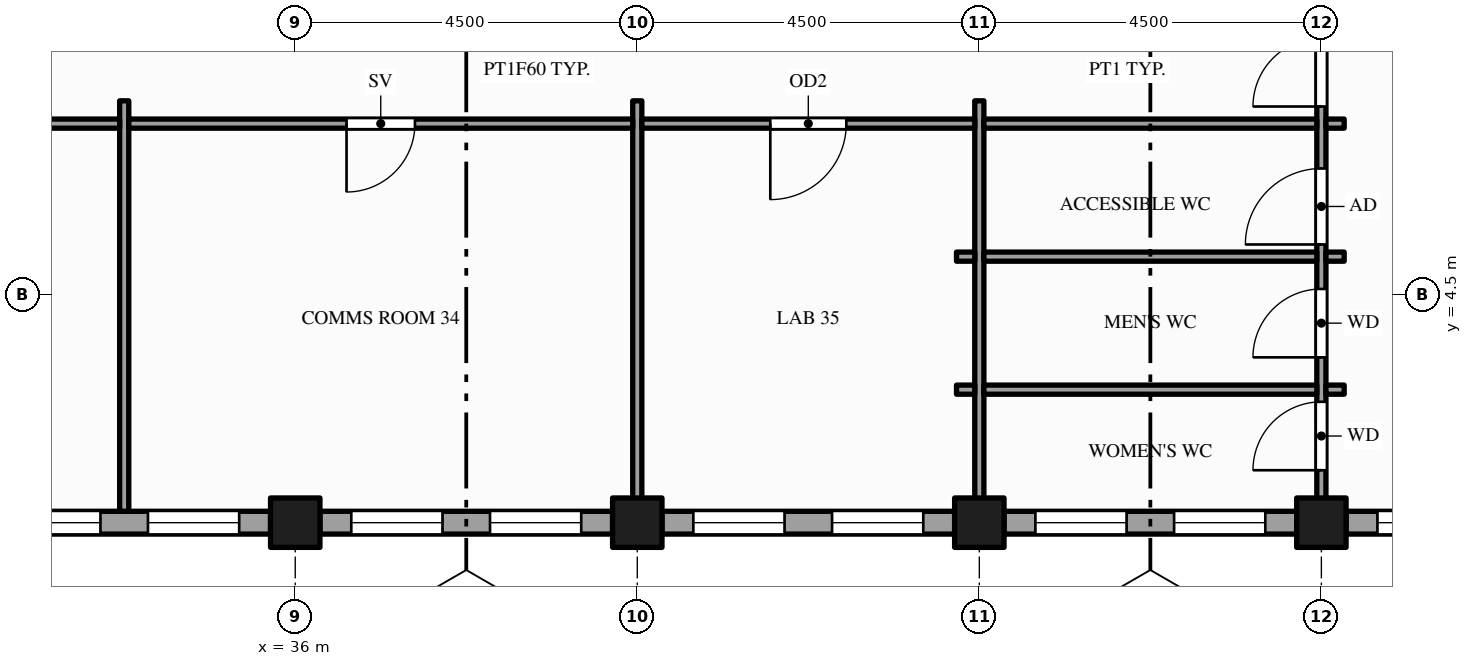
"""IFC4 building model, lengths in metres.
Left out: names, types, materials, properties, quantities, classifications, styles, units other than length and angle.
Written with IfcOpenShell. Run it as: python <this file> out.ifc"""

import sys

from ifc_helpers import new_model, si_unit, direction, frame, frame_2d, origin, origin_2d, place, context, subcontext, project, spatial, rectangle, hollow_rectangle, extrude, element, fill, save


model = new_model("IFC4")
c1 = context("Model", 3, precision=1e-05, world=origin(), true_north=direction((0.0, 1.0)))
c2 = subcontext(c1, "Body", "Model", "MODEL_VIEW")
j1 = project(units=[si_unit("LENGTHUNIT", "METRE"), si_unit("PLANEANGLEUNIT", "RADIAN")], contexts=[c1])
p1 = place(None, origin())
s1 = spatial("IfcSite", under=j1, at=p1, CompositionType="ELEMENT")
p2 = place(p1, origin())
s2 = spatial("IfcBuilding", under=s1, at=p2, CompositionType="ELEMENT")
p3 = place(p2, frame((0.0, 0.0, 269.0)))
s3 = spatial("IfcBuildingStorey", under=s2, at=p3, CompositionType="ELEMENT", Elevation=269.0)
for number, where, z_axis, x_axis in (
    (1, (36.0, 1.5, -0.15), (0.0, 0.0, 1.0), (1.0, 0.0, 0.0)),
    (2, (40.5, 1.5, -0.15), (0.0, 0.0, 1.0), (1.0, 0.0, 0.0)),
    (3, (45.0, 1.5, -0.15), (0.0, 0.0, 1.0), (1.0, 0.0, 0.0)),
    (4, (49.5, 1.5, -0.15), (0.0, 0.0, 1.0), (1.0, 0.0, 0.0)),
):
    element("IfcColumn", number, at=place(p3, frame(where, z_axis=z_axis, x_axis=x_axis)), inside=s3, PredefinedType="COLUMN", context=c2, shape_type="SweptSolid", body=[
        extrude(hollow_rectangle(XDim=0.65, YDim=0.65, WallThickness=0.032, at=origin_2d()), origin(), (0.0, 0.0, 1.0), 4.0),
    ])
p4 = place(p3, frame((31.825, 1.5, 0.0), z_axis=(0.0, 0.0, 1.0), x_axis=(1.0, 0.0, 0.0)))
e5 = element("IfcWall", 5, at=p4, inside=s3, PredefinedType="STANDARD", context=c2, shape_type="SweptSolid", body=[
    extrude(rectangle(XDim=3.85, YDim=0.3, at=frame_2d((1.925, 0.0))), origin(), (0.0, 0.0, 1.0), 2.87),
])
p5 = place(p4, frame((0.413, 0.0, 0.9)))
e6 = element("IfcOpeningElement", 6, at=p5, cuts=e5, PredefinedType="OPENING", context=c2, shape_type="SweptSolid", body=[
    extrude(rectangle(XDim=1.2, YDim=1.75, at=frame_2d((0.6, 0.875))), frame((0.0, 0.16, 0.0), z_axis=(0.0, -1.0, 0.0), x_axis=(1.0, 0.0, 0.0)), (0.0, 0.0, 1.0), 0.32),
])
p6 = place(p4, frame((2.238, 0.0, 0.9)))
e7 = element("IfcOpeningElement", 7, at=p6, cuts=e5, PredefinedType="OPENING", context=c2, shape_type="SweptSolid", body=[
    extrude(rectangle(XDim=1.2, YDim=1.75, at=frame_2d((0.6, 0.875))), frame((0.0, 0.16, 0.0), z_axis=(0.0, -1.0, 0.0), x_axis=(1.0, 0.0, 0.0)), (0.0, 0.0, 1.0), 0.32),
])
p7 = place(p3, frame((36.325, 1.5, 0.0), z_axis=(0.0, 0.0, 1.0), x_axis=(1.0, 0.0, 0.0)))
e8 = element("IfcWall", 8, at=p7, inside=s3, PredefinedType="STANDARD", context=c2, shape_type="SweptSolid", body=[
    extrude(rectangle(XDim=3.85, YDim=0.3, at=frame_2d((1.925, 0.0))), origin(), (0.0, 0.0, 1.0), 2.87),
])
p8 = place(p7, frame((0.413, 0.0, 0.9)))
e9 = element("IfcOpeningElement", 9, at=p8, cuts=e8, PredefinedType="OPENING", context=c2, shape_type="SweptSolid", body=[
    extrude(rectangle(XDim=1.2, YDim=1.75, at=frame_2d((0.6, 0.875))), frame((0.0, 0.16, 0.0), z_axis=(0.0, -1.0, 0.0), x_axis=(1.0, 0.0, 0.0)), (0.0, 0.0, 1.0), 0.32),
])
p9 = place(p7, frame((2.238, 0.0, 0.9)))
e10 = element("IfcOpeningElement", 10, at=p9, cuts=e8, PredefinedType="OPENING", context=c2, shape_type="SweptSolid", body=[
    extrude(rectangle(XDim=1.2, YDim=1.75, at=frame_2d((0.6, 0.875))), frame((0.0, 0.16, 0.0), z_axis=(0.0, -1.0, 0.0), x_axis=(1.0, 0.0, 0.0)), (0.0, 0.0, 1.0), 0.32),
])
p10 = place(p3, frame((40.825, 1.5, 0.0), z_axis=(0.0, 0.0, 1.0), x_axis=(1.0, 0.0, 0.0)))
e11 = element("IfcWall", 11, at=p10, inside=s3, PredefinedType="STANDARD", context=c2, shape_type="SweptSolid", body=[
    extrude(rectangle(XDim=3.85, YDim=0.3, at=frame_2d((1.925, 0.0))), origin(), (0.0, 0.0, 1.0), 2.87),
])
p11 = place(p10, frame((0.413, 0.0, 0.9)))
e12 = element("IfcOpeningElement", 12, at=p11, cuts=e11, PredefinedType="OPENING", context=c2, shape_type="SweptSolid", body=[
    extrude(rectangle(XDim=1.2, YDim=1.75, at=frame_2d((0.6, 0.875))), frame((0.0, 0.16, 0.0), z_axis=(0.0, -1.0, 0.0), x_axis=(1.0, 0.0, 0.0)), (0.0, 0.0, 1.0), 0.32),
])
p12 = place(p10, frame((2.238, 0.0, 0.9)))
e13 = element("IfcOpeningElement", 13, at=p12, cuts=e11, PredefinedType="OPENING", context=c2, shape_type="SweptSolid", body=[
    extrude(rectangle(XDim=1.2, YDim=1.75, at=frame_2d((0.6, 0.875))), frame((0.0, 0.16, 0.0), z_axis=(0.0, -1.0, 0.0), x_axis=(1.0, 0.0, 0.0)), (0.0, 0.0, 1.0), 0.32),
])
p13 = place(p3, frame((45.325, 1.5, 0.0), z_axis=(0.0, 0.0, 1.0), x_axis=(1.0, 0.0, 0.0)))
e14 = element("IfcWall", 14, at=p13, inside=s3, PredefinedType="STANDARD", context=c2, shape_type="SweptSolid", body=[
    extrude(rectangle(XDim=3.85, YDim=0.3, at=frame_2d((1.925, 0.0))), origin(), (0.0, 0.0, 1.0), 2.87),
])
p14 = place(p13, frame((0.413, 0.0, 0.9)))
e15 = element("IfcOpeningElement", 15, at=p14, cuts=e14, PredefinedType="OPENING", context=c2, shape_type="SweptSolid", body=[
    extrude(rectangle(XDim=1.2, YDim=1.75, at=frame_2d((0.6, 0.875))), frame((0.0, 0.16, 0.0), z_axis=(0.0, -1.0, 0.0), x_axis=(1.0, 0.0, 0.0)), (0.0, 0.0, 1.0), 0.32),
])
p15 = place(p13, frame((2.238, 0.0, 0.9)))
e16 = element("IfcOpeningElement", 16, at=p15, cuts=e14, PredefinedType="OPENING", context=c2, shape_type="SweptSolid", body=[
    extrude(rectangle(XDim=1.2, YDim=1.75, at=frame_2d((0.6, 0.875))), frame((0.0, 0.16, 0.0), z_axis=(0.0, -1.0, 0.0), x_axis=(1.0, 0.0, 0.0)), (0.0, 0.0, 1.0), 0.32),
])
p16 = place(p3, frame((49.825, 1.5, 0.0), z_axis=(0.0, 0.0, 1.0), x_axis=(1.0, 0.0, 0.0)))
e17 = element("IfcWall", 17, at=p16, inside=s3, PredefinedType="STANDARD", context=c2, shape_type="SweptSolid", body=[
    extrude(rectangle(XDim=4.175, YDim=0.3, at=frame_2d((2.087, 0.0))), origin(), (0.0, 0.0, 1.0), 2.87),
])
p17 = place(p16, frame((0.413, 0.0, 0.9)))
e18 = element("IfcOpeningElement", 18, at=p17, cuts=e17, PredefinedType="OPENING", context=c2, shape_type="SweptSolid", body=[
    extrude(rectangle(XDim=1.2, YDim=1.75, at=frame_2d((0.6, 0.875))), frame((0.0, 0.16, 0.0), z_axis=(0.0, -1.0, 0.0), x_axis=(1.0, 0.0, 0.0)), (0.0, 0.0, 1.0), 0.32),
])
p18 = place(p16, frame((2.225, 0.0, 0.9)))
e19 = element("IfcOpeningElement", 19, at=p18, cuts=e17, PredefinedType="OPENING", context=c2, shape_type="SweptSolid", body=[
    extrude(rectangle(XDim=1.55, YDim=1.75, at=frame_2d((0.775, 0.875))), frame((0.0, 0.16, 0.0), z_axis=(0.0, -1.0, 0.0), x_axis=(1.0, 0.0, 0.0)), (0.0, 0.0, 1.0), 0.32),
])
for number, where, z_axis, x_axis in (
    (20, (33.75, 1.65, 0.0), (0.0, 0.0, 1.0), (0.0, 1.0, 0.0)),
    (21, (40.5, 1.65, 0.0), (0.0, 0.0, 1.0), (0.0, 1.0, 0.0)),
    (22, (45.0, 1.65, 0.0), (0.0, 0.0, 1.0), (0.0, 1.0, 0.0)),
):
    element("IfcWall", number, at=place(p3, frame(where, z_axis=z_axis, x_axis=x_axis)), inside=s3, PredefinedType="PARTITIONING", context=c2, shape_type="SweptSolid", body=[
        extrude(rectangle(XDim=5.4, YDim=0.12, at=frame_2d((2.7, 0.0))), origin(), (0.0, 0.0, 1.0), 2.87),
    ])
p19 = place(p3, frame((49.5, 1.65, 0.0), z_axis=(0.0, 0.0, 1.0), x_axis=(0.0, 1.0, 0.0)))
e23 = element("IfcWall", 23, at=p19, inside=s3, PredefinedType="PARTITIONING", context=c2, shape_type="SweptSolid", body=[
    extrude(rectangle(XDim=22.2, YDim=0.12, at=frame_2d((11.1, 0.0))), origin(), (0.0, 0.0, 1.0), 2.87),
])
p20 = place(p19, frame((5.325, 0.0, 0.0)))
e24 = element("IfcOpeningElement", 24, at=p20, cuts=e23, PredefinedType="OPENING", context=c2, shape_type="SweptSolid", body=[
    extrude(rectangle(XDim=1.8, YDim=2.1, at=frame_2d((0.9, 1.05))), frame((0.0, 0.07, 0.0), z_axis=(0.0, -1.0, 0.0), x_axis=(1.0, 0.0, 0.0)), (0.0, 0.0, 1.0), 0.14),
])
p21 = place(p19, frame((0.54, 0.0, 0.0)))
e25 = element("IfcOpeningElement", 25, at=p21, cuts=e23, PredefinedType="OPENING", context=c2, shape_type="SweptSolid", body=[
    extrude(rectangle(XDim=0.9, YDim=2.1, at=frame_2d((0.45, 1.05))), frame((0.0, 0.07, 0.0), z_axis=(0.0, -1.0, 0.0), x_axis=(1.0, 0.0, 0.0)), (0.0, 0.0, 1.0), 0.14),
])
p22 = place(p19, frame((2.025, 0.0, 0.0)))
e26 = element("IfcOpeningElement", 26, at=p22, cuts=e23, PredefinedType="OPENING", context=c2, shape_type="SweptSolid", body=[
    extrude(rectangle(XDim=0.9, YDim=2.1, at=frame_2d((0.45, 1.05))), frame((0.0, 0.07, 0.0), z_axis=(0.0, -1.0, 0.0), x_axis=(1.0, 0.0, 0.0)), (0.0, 0.0, 1.0), 0.14),
])
p23 = place(p19, frame((3.51, 0.0, 0.0)))
e27 = element("IfcOpeningElement", 27, at=p23, cuts=e23, PredefinedType="OPENING", context=c2, shape_type="SweptSolid", body=[
    extrude(rectangle(XDim=1.0, YDim=2.1, at=frame_2d((0.5, 1.05))), frame((0.0, 0.07, 0.0), z_axis=(0.0, -1.0, 0.0), x_axis=(1.0, 0.0, 0.0)), (0.0, 0.0, 1.0), 0.14),
])
p24 = place(p3, frame((44.7, 3.25, 0.0), z_axis=(0.0, 0.0, 1.0), x_axis=(1.0, 0.0, 0.0)))
e28 = element("IfcWall", 28, at=p24, inside=s3, PredefinedType="PARTITIONING", context=c2, shape_type="SweptSolid", body=[
    extrude(rectangle(XDim=0.24, YDim=0.12, at=frame_2d((0.12, 0.0))), origin(), (0.0, 0.0, 1.0), 2.87),
])
p25 = place(p3, frame((45.06, 3.25, 0.0), z_axis=(0.0, 0.0, 1.0), x_axis=(1.0, 0.0, 0.0)))
e29 = element("IfcWall", 29, at=p25, inside=s3, PredefinedType="PARTITIONING", context=c2, shape_type="SweptSolid", body=[
    extrude(rectangle(XDim=4.38, YDim=0.12, at=frame_2d((2.19, 0.0))), origin(), (0.0, 0.0, 1.0), 2.87),
])
for number, where, z_axis, x_axis in (
    (30, (49.56, 3.25, 0.0), (0.0, 0.0, 1.0), (1.0, 0.0, 0.0)),
    (31, (44.7, 5.0, 0.0), (0.0, 0.0, 1.0), (1.0, 0.0, 0.0)),
):
    element("IfcWall", number, at=place(p3, frame(where, z_axis=z_axis, x_axis=x_axis)), inside=s3, PredefinedType="PARTITIONING", context=c2, shape_type="SweptSolid", body=[
        extrude(rectangle(XDim=0.24, YDim=0.12, at=frame_2d((0.12, 0.0))), origin(), (0.0, 0.0, 1.0), 2.87),
    ])
p26 = place(p3, frame((45.06, 5.0, 0.0), z_axis=(0.0, 0.0, 1.0), x_axis=(1.0, 0.0, 0.0)))
e32 = element("IfcWall", 32, at=p26, inside=s3, PredefinedType="PARTITIONING", context=c2, shape_type="SweptSolid", body=[
    extrude(rectangle(XDim=4.38, YDim=0.12, at=frame_2d((2.19, 0.0))), origin(), (0.0, 0.0, 1.0), 2.87),
])
p27 = place(p3, frame((49.56, 5.0, 0.0), z_axis=(0.0, 0.0, 1.0), x_axis=(1.0, 0.0, 0.0)))
e33 = element("IfcWall", 33, at=p27, inside=s3, PredefinedType="PARTITIONING", context=c2, shape_type="SweptSolid", body=[
    extrude(rectangle(XDim=0.24, YDim=0.12, at=frame_2d((0.12, 0.0))), origin(), (0.0, 0.0, 1.0), 2.87),
])
p28 = place(p3, frame((27.06, 6.75, 0.0), z_axis=(0.0, 0.0, 1.0), x_axis=(1.0, 0.0, 0.0)))
e34 = element("IfcWall", 34, at=p28, inside=s3, PredefinedType="PARTITIONING", context=c2, shape_type="SweptSolid", body=[
    extrude(rectangle(XDim=6.63, YDim=0.12, at=frame_2d((3.315, 0.0))), origin(), (0.0, 0.0, 1.0), 2.87),
])
p29 = place(p28, frame((2.815, 0.0, 0.0)))
e35 = element("IfcOpeningElement", 35, at=p29, cuts=e34, PredefinedType="OPENING", context=c2, shape_type="SweptSolid", body=[
    extrude(rectangle(XDim=1.0, YDim=2.1, at=frame_2d((0.5, 1.05))), frame((0.0, 0.07, 0.0), z_axis=(0.0, -1.0, 0.0), x_axis=(1.0, 0.0, 0.0)), (0.0, 0.0, 1.0), 0.14),
])
p30 = place(p3, frame((33.81, 6.75, 0.0), z_axis=(0.0, 0.0, 1.0), x_axis=(1.0, 0.0, 0.0)))
e36 = element("IfcWall", 36, at=p30, inside=s3, PredefinedType="PARTITIONING", context=c2, shape_type="SweptSolid", body=[
    extrude(rectangle(XDim=6.63, YDim=0.12, at=frame_2d((3.315, 0.0))), origin(), (0.0, 0.0, 1.0), 2.87),
])
p31 = place(p30, frame((2.865, 0.0, 0.0)))
e37 = element("IfcOpeningElement", 37, at=p31, cuts=e36, PredefinedType="OPENING", context=c2, shape_type="SweptSolid", body=[
    extrude(rectangle(XDim=0.9, YDim=2.1, at=frame_2d((0.45, 1.05))), frame((0.0, 0.07, 0.0), z_axis=(0.0, -1.0, 0.0), x_axis=(1.0, 0.0, 0.0)), (0.0, 0.0, 1.0), 0.14),
])
p32 = place(p3, frame((40.56, 6.75, 0.0), z_axis=(0.0, 0.0, 1.0), x_axis=(1.0, 0.0, 0.0)))
e38 = element("IfcWall", 38, at=p32, inside=s3, PredefinedType="PARTITIONING", context=c2, shape_type="SweptSolid", body=[
    extrude(rectangle(XDim=4.38, YDim=0.12, at=frame_2d((2.19, 0.0))), origin(), (0.0, 0.0, 1.0), 2.87),
])
p33 = place(p32, frame((1.69, 0.0, 0.0)))
e39 = element("IfcOpeningElement", 39, at=p33, cuts=e38, PredefinedType="OPENING", context=c2, shape_type="SweptSolid", body=[
    extrude(rectangle(XDim=1.0, YDim=2.1, at=frame_2d((0.5, 1.05))), frame((0.0, 0.07, 0.0), z_axis=(0.0, -1.0, 0.0), x_axis=(1.0, 0.0, 0.0)), (0.0, 0.0, 1.0), 0.14),
])
p34 = place(p3, frame((45.06, 6.75, 0.0), z_axis=(0.0, 0.0, 1.0), x_axis=(1.0, 0.0, 0.0)))
e40 = element("IfcWall", 40, at=p34, inside=s3, PredefinedType="PARTITIONING", context=c2, shape_type="SweptSolid", body=[
    extrude(rectangle(XDim=4.38, YDim=0.12, at=frame_2d((2.19, 0.0))), origin(), (0.0, 0.0, 1.0), 2.87),
])
p35 = place(p3, frame((49.56, 6.75, 0.0), z_axis=(0.0, 0.0, 1.0), x_axis=(1.0, 0.0, 0.0)))
e41 = element("IfcWall", 41, at=p35, inside=s3, PredefinedType="PARTITIONING", context=c2, shape_type="SweptSolid", body=[
    extrude(rectangle(XDim=0.24, YDim=0.12, at=frame_2d((0.12, 0.0))), origin(), (0.0, 0.0, 1.0), 2.87),
])
p36 = place(p5, origin())
e42 = element("IfcWindow", 42, at=p36, inside=s3, PartitioningType="SINGLE_PANEL", PredefinedType="WINDOW", context=c2, shape_type="SweptSolid", body=[
    extrude(rectangle(XDim=1.2, YDim=1.75, at=frame_2d((0.6, 0.875))), frame((0.0, 0.03, 0.0), z_axis=(0.0, -1.0, 0.0), x_axis=(1.0, 0.0, 0.0)), (0.0, 0.0, 1.0), 0.06),
])
fill(e6, e42)
p37 = place(p6, origin())
e43 = element("IfcWindow", 43, at=p37, inside=s3, PartitioningType="SINGLE_PANEL", PredefinedType="WINDOW", context=c2, shape_type="SweptSolid", body=[
    extrude(rectangle(XDim=1.2, YDim=1.75, at=frame_2d((0.6, 0.875))), frame((0.0, 0.03, 0.0), z_axis=(0.0, -1.0, 0.0), x_axis=(1.0, 0.0, 0.0)), (0.0, 0.0, 1.0), 0.06),
])
fill(e7, e43)
p38 = place(p8, origin())
e44 = element("IfcWindow", 44, at=p38, inside=s3, PartitioningType="SINGLE_PANEL", PredefinedType="WINDOW", context=c2, shape_type="SweptSolid", body=[
    extrude(rectangle(XDim=1.2, YDim=1.75, at=frame_2d((0.6, 0.875))), frame((0.0, 0.03, 0.0), z_axis=(0.0, -1.0, 0.0), x_axis=(1.0, 0.0, 0.0)), (0.0, 0.0, 1.0), 0.06),
])
fill(e9, e44)
p39 = place(p9, origin())
e45 = element("IfcWindow", 45, at=p39, inside=s3, PartitioningType="SINGLE_PANEL", PredefinedType="WINDOW", context=c2, shape_type="SweptSolid", body=[
    extrude(rectangle(XDim=1.2, YDim=1.75, at=frame_2d((0.6, 0.875))), frame((0.0, 0.03, 0.0), z_axis=(0.0, -1.0, 0.0), x_axis=(1.0, 0.0, 0.0)), (0.0, 0.0, 1.0), 0.06),
])
fill(e10, e45)
p40 = place(p11, origin())
e46 = element("IfcWindow", 46, at=p40, inside=s3, PartitioningType="SINGLE_PANEL", PredefinedType="WINDOW", context=c2, shape_type="SweptSolid", body=[
    extrude(rectangle(XDim=1.2, YDim=1.75, at=frame_2d((0.6, 0.875))), frame((0.0, 0.03, 0.0), z_axis=(0.0, -1.0, 0.0), x_axis=(1.0, 0.0, 0.0)), (0.0, 0.0, 1.0), 0.06),
])
fill(e12, e46)
p41 = place(p12, origin())
e47 = element("IfcWindow", 47, at=p41, inside=s3, PartitioningType="SINGLE_PANEL", PredefinedType="WINDOW", context=c2, shape_type="SweptSolid", body=[
    extrude(rectangle(XDim=1.2, YDim=1.75, at=frame_2d((0.6, 0.875))), frame((0.0, 0.03, 0.0), z_axis=(0.0, -1.0, 0.0), x_axis=(1.0, 0.0, 0.0)), (0.0, 0.0, 1.0), 0.06),
])
fill(e13, e47)
p42 = place(p14, origin())
e48 = element("IfcWindow", 48, at=p42, inside=s3, PartitioningType="SINGLE_PANEL", PredefinedType="WINDOW", context=c2, shape_type="SweptSolid", body=[
    extrude(rectangle(XDim=1.2, YDim=1.75, at=frame_2d((0.6, 0.875))), frame((0.0, 0.03, 0.0), z_axis=(0.0, -1.0, 0.0), x_axis=(1.0, 0.0, 0.0)), (0.0, 0.0, 1.0), 0.06),
])
fill(e15, e48)
p43 = place(p15, origin())
e49 = element("IfcWindow", 49, at=p43, inside=s3, PartitioningType="SINGLE_PANEL", PredefinedType="WINDOW", context=c2, shape_type="SweptSolid", body=[
    extrude(rectangle(XDim=1.2, YDim=1.75, at=frame_2d((0.6, 0.875))), frame((0.0, 0.03, 0.0), z_axis=(0.0, -1.0, 0.0), x_axis=(1.0, 0.0, 0.0)), (0.0, 0.0, 1.0), 0.06),
])
fill(e16, e49)
p44 = place(p17, origin())
e50 = element("IfcWindow", 50, at=p44, inside=s3, PartitioningType="SINGLE_PANEL", PredefinedType="WINDOW", context=c2, shape_type="SweptSolid", body=[
    extrude(rectangle(XDim=1.2, YDim=1.75, at=frame_2d((0.6, 0.875))), frame((0.0, 0.03, 0.0), z_axis=(0.0, -1.0, 0.0), x_axis=(1.0, 0.0, 0.0)), (0.0, 0.0, 1.0), 0.06),
])
fill(e18, e50)
p45 = place(p20, origin())
e51 = element("IfcDoor", 51, at=p45, inside=s3, OperationType="DOUBLE_DOOR_SINGLE_SWING", PredefinedType="DOOR", context=c2, shape_type="SweptSolid", body=[
    extrude(rectangle(XDim=1.8, YDim=2.1, at=frame_2d((0.9, 1.05))), frame((0.0, 0.025, 0.0), z_axis=(0.0, -1.0, 0.0), x_axis=(1.0, 0.0, 0.0)), (0.0, 0.0, 1.0), 0.05),
])
fill(e24, e51)
p46 = place(p31, origin())
e52 = element("IfcDoor", 52, at=p46, inside=s3, OperationType="SINGLE_SWING_LEFT", PredefinedType="DOOR", context=c2, shape_type="SweptSolid", body=[
    extrude(rectangle(XDim=0.9, YDim=2.1, at=frame_2d((0.45, 1.05))), frame((0.0, 0.025, 0.0), z_axis=(0.0, -1.0, 0.0), x_axis=(1.0, 0.0, 0.0)), (0.0, 0.0, 1.0), 0.05),
])
fill(e37, e52)
p47 = place(p33, origin())
e53 = element("IfcDoor", 53, at=p47, inside=s3, OperationType="SINGLE_SWING_LEFT", PredefinedType="DOOR", context=c2, shape_type="SweptSolid", body=[
    extrude(rectangle(XDim=1.0, YDim=2.1, at=frame_2d((0.5, 1.05))), frame((0.0, 0.025, 0.0), z_axis=(0.0, -1.0, 0.0), x_axis=(1.0, 0.0, 0.0)), (0.0, 0.0, 1.0), 0.05),
])
fill(e39, e53)
p48 = place(p21, origin())
e54 = element("IfcDoor", 54, at=p48, inside=s3, OperationType="SINGLE_SWING_LEFT", PredefinedType="DOOR", context=c2, shape_type="SweptSolid", body=[
    extrude(rectangle(XDim=0.9, YDim=2.1, at=frame_2d((0.45, 1.05))), frame((0.0, 0.025, 0.0), z_axis=(0.0, -1.0, 0.0), x_axis=(1.0, 0.0, 0.0)), (0.0, 0.0, 1.0), 0.05),
])
fill(e25, e54)
p49 = place(p22, origin())
e55 = element("IfcDoor", 55, at=p49, inside=s3, OperationType="SINGLE_SWING_LEFT", PredefinedType="DOOR", context=c2, shape_type="SweptSolid", body=[
    extrude(rectangle(XDim=0.9, YDim=2.1, at=frame_2d((0.45, 1.05))), frame((0.0, 0.025, 0.0), z_axis=(0.0, -1.0, 0.0), x_axis=(1.0, 0.0, 0.0)), (0.0, 0.0, 1.0), 0.05),
])
fill(e26, e55)
p50 = place(p23, origin())
e56 = element("IfcDoor", 56, at=p50, inside=s3, OperationType="SINGLE_SWING_LEFT", PredefinedType="DOOR", context=c2, shape_type="SweptSolid", body=[
    extrude(rectangle(XDim=1.0, YDim=2.1, at=frame_2d((0.5, 1.05))), frame((0.0, 0.025, 0.0), z_axis=(0.0, -1.0, 0.0), x_axis=(1.0, 0.0, 0.0)), (0.0, 0.0, 1.0), 0.05),
])
fill(e27, e56)
save(model, sys.argv[1])
